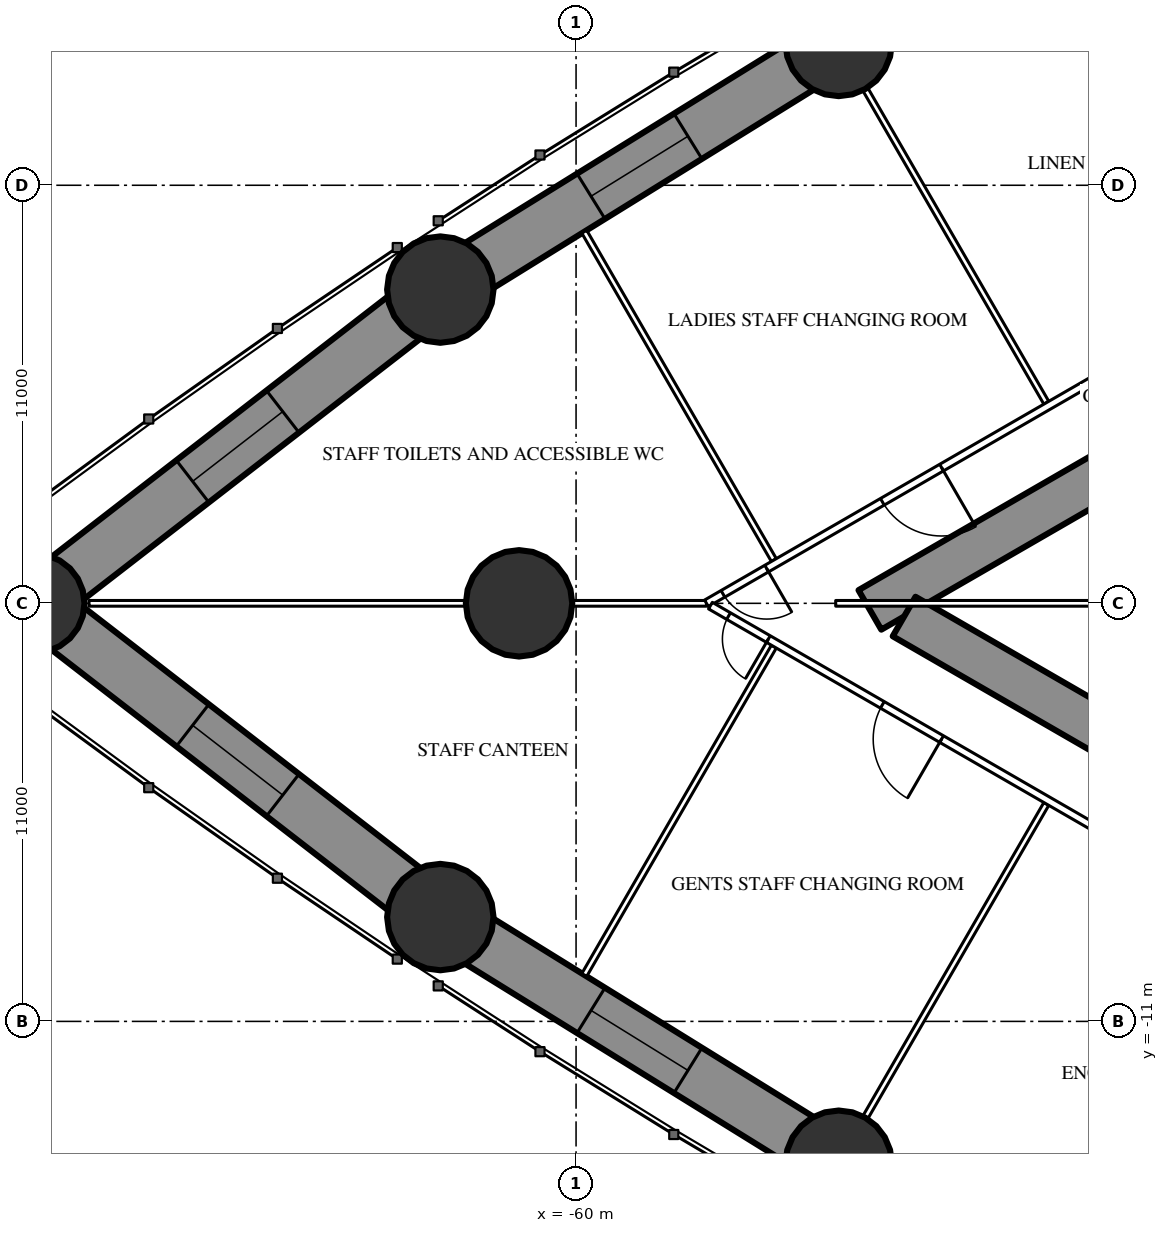
"""IFC4 building model, lengths in metres.
Left out: names, types, materials, properties, quantities, classifications, styles, units other than length and angle.
Written with IfcOpenShell. Run it as: python <this file> out.ifc"""

import sys

from ifc_helpers import new_model, si_unit, direction, frame, frame_2d, origin, origin_2d, place, context, subcontext, project, spatial, rectangle, hollow_circle, extrude, element, fill, save


model = new_model("IFC4")
c1 = context("Model", 3, precision=1e-05, world=origin(), true_north=direction((0.0, 1.0)))
c2 = subcontext(c1, "Body", "Model", "MODEL_VIEW")
j1 = project(units=[si_unit("LENGTHUNIT", "METRE"), si_unit("PLANEANGLEUNIT", "RADIAN")], contexts=[c1])
p1 = place(None, origin())
s1 = spatial("IfcSite", under=j1, at=p1, CompositionType="ELEMENT")
p2 = place(p1, origin())
s2 = spatial("IfcBuilding", under=s1, at=p2, CompositionType="ELEMENT")
p3 = place(p2, frame((0.0, 0.0, 77.5)))
s3 = spatial("IfcBuildingStorey", under=s2, at=p3, CompositionType="ELEMENT", Elevation=77.5)
p4 = place(p3, frame((-74.235, 0.0, 0.0), z_axis=(0.0, 0.0, 1.0), x_axis=(1.0, 0.0, 0.0)))
e1 = element("IfcColumn", 1, at=p4, inside=s3, PredefinedType="COLUMN", context=c2, shape_type="SweptSolid", body=[
    extrude(hollow_circle(Radius=1.3, WallThickness=0.1, at=origin_2d()), origin(), (0.0, 0.0, 1.0), 3.5),
])
for number, where, z_axis, x_axis in (
    (2, (-63.572, -8.255, 0.0), (0.0, 0.0, 1.0), (1.0, 0.0, 0.0)),
    (3, (-53.09, -14.745, 0.0), (0.0, 0.0, 1.0), (1.0, 0.0, 0.0)),
    (4, (-53.09, 14.745, 0.0), (0.0, 0.0, 1.0), (1.0, 0.0, 0.0)),
    (5, (-63.572, 8.255, 0.0), (0.0, 0.0, 1.0), (1.0, 0.0, 0.0)),
):
    element("IfcColumn", number, at=place(p3, frame(where, z_axis=z_axis, x_axis=x_axis)), inside=s3, PredefinedType="COLUMN", context=c2, shape_type="SweptSolid", body=[
        extrude(hollow_circle(Radius=1.4, WallThickness=0.12, at=origin_2d()), origin(), (0.0, 0.0, 1.0), 3.5),
    ])
p5 = place(p3, frame((-61.5, 0.0, 0.0), z_axis=(0.0, 0.0, 1.0), x_axis=(1.0, 0.0, 0.0)))
e6 = element("IfcColumn", 6, at=p5, inside=s3, PredefinedType="COLUMN", context=c2, shape_type="SweptSolid", body=[
    extrude(hollow_circle(Radius=1.4, WallThickness=0.1, at=origin_2d()), origin(), (0.0, 0.0, 1.0), 3.5),
])
p6 = place(p3, frame((-27.2, 14.3, 0.0), z_axis=(0.0, 0.0, 1.0), x_axis=(-0.866026593062, -0.499997940104, 0.0)))
e7 = element("IfcWall", 7, at=p6, inside=s3, PredefinedType="SHEAR", context=c2, shape_type="SweptSolid", body=[
    extrude(rectangle(XDim=28.946, YDim=1.2, at=frame_2d((14.473, 0.0))), origin(), (0.0, 0.0, 1.0), 3.5),
])
p7 = place(p6, frame((5.85, 0.0, 0.0)))
e8 = element("IfcOpeningElement", 8, at=p7, cuts=e7, PredefinedType="OPENING", context=c2, shape_type="SweptSolid", body=[
    extrude(rectangle(XDim=1.0, YDim=2.2, at=frame_2d((0.5, 1.1))), frame((0.0, 0.61, 0.0), z_axis=(0.0, -1.0, 0.0), x_axis=(1.0, 0.0, 0.0)), (0.0, 0.0, 1.0), 1.22),
])
p8 = place(p6, frame((13.395, 0.0, 0.0)))
e9 = element("IfcOpeningElement", 9, at=p8, cuts=e7, PredefinedType="OPENING", context=c2, shape_type="SweptSolid", body=[
    extrude(rectangle(XDim=1.8, YDim=2.04, at=frame_2d((0.9, 1.02))), frame((0.0, 0.61, 0.0), z_axis=(0.0, -1.0, 0.0), x_axis=(1.0, 0.0, 0.0)), (0.0, 0.0, 1.0), 1.22),
])
p9 = place(p3, frame((-27.2, -14.3, 0.0), z_axis=(0.0, 0.0, 1.0), x_axis=(-0.866024021859, 0.500002393557, 0.0)))
e10 = element("IfcWall", 10, at=p9, inside=s3, PredefinedType="SHEAR", context=c2, shape_type="SweptSolid", body=[
    extrude(rectangle(XDim=27.907, YDim=1.2, at=frame_2d((13.954, 0.0))), origin(), (0.0, 0.0, 1.0), 3.5),
])
p10 = place(p9, frame((4.6, 0.0, 0.0)))
e11 = element("IfcOpeningElement", 11, at=p10, cuts=e10, PredefinedType="OPENING", context=c2, shape_type="SweptSolid", body=[
    extrude(rectangle(XDim=1.0, YDim=2.2, at=frame_2d((0.5, 1.1))), frame((0.0, 0.61, 0.0), z_axis=(0.0, -1.0, 0.0), x_axis=(1.0, 0.0, 0.0)), (0.0, 0.0, 1.0), 1.22),
])
p11 = place(p9, frame((13.845, 0.0, 0.0)))
e12 = element("IfcOpeningElement", 12, at=p11, cuts=e10, PredefinedType="OPENING", context=c2, shape_type="SweptSolid", body=[
    extrude(rectangle(XDim=1.8, YDim=2.2, at=frame_2d((0.9, 1.1))), frame((0.0, 0.61, 0.0), z_axis=(0.0, -1.0, 0.0), x_axis=(1.0, 0.0, 0.0)), (0.0, 0.0, 1.0), 1.22),
])
p12 = place(p3, frame((-42.245, 20.607, 0.0), z_axis=(0.0, 0.0, 1.0), x_axis=(-0.879692855603, -0.475542300749, 0.0)))
e13 = element("IfcWall", 13, at=p12, inside=s3, PredefinedType="SHEAR", context=c2, shape_type="SweptSolid", body=[
    extrude(rectangle(XDim=12.328, YDim=1.4, at=frame_2d((6.164, 0.0))), origin(), (0.0, 0.0, 1.0), 3.5),
])
p13 = place(p12, frame((4.664, 0.0, 0.6)))
e14 = element("IfcOpeningElement", 14, at=p13, cuts=e13, PredefinedType="OPENING", context=c2, shape_type="SweptSolid", body=[
    extrude(rectangle(XDim=3.0, YDim=1.2, at=frame_2d((1.5, 0.6))), frame((0.0, 0.71, 0.0), z_axis=(0.0, -1.0, 0.0), x_axis=(1.0, 0.0, 0.0)), (0.0, 0.0, 1.0), 1.42),
])
p14 = place(p3, frame((-53.09, 14.745, 0.0), z_axis=(0.0, 0.0, 1.0), x_axis=(-0.850225894333, -0.526418016984, 0.0)))
e15 = element("IfcWall", 15, at=p14, inside=s3, PredefinedType="SHEAR", context=c2, shape_type="SweptSolid", body=[
    extrude(rectangle(XDim=12.328, YDim=1.4, at=frame_2d((6.164, 0.0))), origin(), (0.0, 0.0, 1.0), 3.5),
])
p15 = place(p14, frame((4.664, 0.0, 0.6)))
e16 = element("IfcOpeningElement", 16, at=p15, cuts=e15, PredefinedType="OPENING", context=c2, shape_type="SweptSolid", body=[
    extrude(rectangle(XDim=3.0, YDim=1.2, at=frame_2d((1.5, 0.6))), frame((0.0, 0.71, 0.0), z_axis=(0.0, -1.0, 0.0), x_axis=(1.0, 0.0, 0.0)), (0.0, 0.0, 1.0), 1.42),
])
p16 = place(p3, frame((-63.572, 8.255, 0.0), z_axis=(0.0, 0.0, 1.0), x_axis=(-0.790736428665, -0.612156761281, 0.0)))
e17 = element("IfcWall", 17, at=p16, inside=s3, PredefinedType="SHEAR", context=c2, shape_type="SweptSolid", body=[
    extrude(rectangle(XDim=13.485, YDim=1.4, at=frame_2d((6.743, 0.0))), origin(), (0.0, 0.0, 1.0), 3.5),
])
p17 = place(p16, frame((5.243, 0.0, 0.6)))
e18 = element("IfcOpeningElement", 18, at=p17, cuts=e17, PredefinedType="OPENING", context=c2, shape_type="SweptSolid", body=[
    extrude(rectangle(XDim=3.0, YDim=1.2, at=frame_2d((1.5, 0.6))), frame((0.0, 0.71, 0.0), z_axis=(0.0, -1.0, 0.0), x_axis=(1.0, 0.0, 0.0)), (0.0, 0.0, 1.0), 1.42),
])
p18 = place(p3, frame((-74.235, 0.0, 0.0), z_axis=(0.0, 0.0, 1.0), x_axis=(0.790736428665, -0.612156761281, 0.0)))
e19 = element("IfcWall", 19, at=p18, inside=s3, PredefinedType="SHEAR", context=c2, shape_type="SweptSolid", body=[
    extrude(rectangle(XDim=13.485, YDim=1.4, at=frame_2d((6.743, 0.0))), origin(), (0.0, 0.0, 1.0), 3.5),
])
p19 = place(p18, frame((5.243, 0.0, 0.6)))
e20 = element("IfcOpeningElement", 20, at=p19, cuts=e19, PredefinedType="OPENING", context=c2, shape_type="SweptSolid", body=[
    extrude(rectangle(XDim=3.0, YDim=1.2, at=frame_2d((1.5, 0.6))), frame((0.0, 0.71, 0.0), z_axis=(0.0, -1.0, 0.0), x_axis=(1.0, 0.0, 0.0)), (0.0, 0.0, 1.0), 1.42),
])
p20 = place(p3, frame((-63.572, -8.255, 0.0), z_axis=(0.0, 0.0, 1.0), x_axis=(0.850225894333, -0.526418016984, 0.0)))
e21 = element("IfcWall", 21, at=p20, inside=s3, PredefinedType="SHEAR", context=c2, shape_type="SweptSolid", body=[
    extrude(rectangle(XDim=12.328, YDim=1.4, at=frame_2d((6.164, 0.0))), origin(), (0.0, 0.0, 1.0), 3.5),
])
p21 = place(p20, frame((4.664, 0.0, 0.6)))
e22 = element("IfcOpeningElement", 22, at=p21, cuts=e21, PredefinedType="OPENING", context=c2, shape_type="SweptSolid", body=[
    extrude(rectangle(XDim=3.0, YDim=1.2, at=frame_2d((1.5, 0.6))), frame((0.0, 0.71, 0.0), z_axis=(0.0, -1.0, 0.0), x_axis=(1.0, 0.0, 0.0)), (0.0, 0.0, 1.0), 1.42),
])
p22 = place(p3, frame((-53.09, -14.745, 0.0), z_axis=(0.0, 0.0, 1.0), x_axis=(0.879692855603, -0.475542300749, 0.0)))
e23 = element("IfcWall", 23, at=p22, inside=s3, PredefinedType="SHEAR", context=c2, shape_type="SweptSolid", body=[
    extrude(rectangle(XDim=12.328, YDim=1.4, at=frame_2d((6.164, 0.0))), origin(), (0.0, 0.0, 1.0), 3.5),
])
p23 = place(p22, frame((4.664, 0.0, 0.6)))
e24 = element("IfcOpeningElement", 24, at=p23, cuts=e23, PredefinedType="OPENING", context=c2, shape_type="SweptSolid", body=[
    extrude(rectangle(XDim=3.0, YDim=1.2, at=frame_2d((1.5, 0.6))), frame((0.0, 0.71, 0.0), z_axis=(0.0, -1.0, 0.0), x_axis=(1.0, 0.0, 0.0)), (0.0, 0.0, 1.0), 1.42),
])
p24 = place(p3, frame((-47.627, 5.278, 0.0), z_axis=(0.0, 0.0, 1.0), x_axis=(-0.500009844318, 0.86601972009, 0.0)))
e25 = element("IfcWall", 25, at=p24, inside=s3, PredefinedType="PARTITIONING", context=c2, shape_type="SweptSolid", body=[
    extrude(rectangle(XDim=9.51, YDim=0.15, at=frame_2d((4.755, 0.0))), origin(), (0.0, 0.0, 1.0), 2.05),
])
p25 = place(p3, frame((-54.796, 1.139, 0.0), z_axis=(0.0, 0.0, 1.0), x_axis=(-0.500000698915, 0.866025000265, 0.0)))
e26 = element("IfcWall", 26, at=p25, inside=s3, PredefinedType="PARTITIONING", context=c2, shape_type="SweptSolid", body=[
    extrude(rectangle(XDim=9.975, YDim=0.15, at=frame_2d((4.988, 0.0))), origin(), (0.0, 0.0, 1.0), 3.25),
])
p26 = place(p3, frame((-47.627, -5.278, 0.0), z_axis=(0.0, 0.0, 1.0), x_axis=(-0.500009844318, -0.86601972009, 0.0)))
e27 = element("IfcWall", 27, at=p26, inside=s3, PredefinedType="PARTITIONING", context=c2, shape_type="SweptSolid", body=[
    extrude(rectangle(XDim=9.51, YDim=0.15, at=frame_2d((4.755, 0.0))), origin(), (0.0, 0.0, 1.0), 2.05),
])
p27 = place(p3, frame((-54.796, -1.139, 0.0), z_axis=(0.0, 0.0, 1.0), x_axis=(-0.500000698915, -0.866025000265, 0.0)))
e28 = element("IfcWall", 28, at=p27, inside=s3, PredefinedType="PARTITIONING", context=c2, shape_type="SweptSolid", body=[
    extrude(rectangle(XDim=9.975, YDim=0.15, at=frame_2d((4.988, 0.0))), origin(), (0.0, 0.0, 1.0), 3.25),
])
p28 = place(p3, frame((-56.568, 0.0, 0.0), z_axis=(0.0, 0.0, 1.0), x_axis=(-1.0, 0.0, 0.0)))
e29 = element("IfcWall", 29, at=p28, inside=s3, PredefinedType="PARTITIONING", context=c2, shape_type="SweptSolid", body=[
    extrude(rectangle(XDim=16.247, YDim=0.15, at=frame_2d((8.124, 0.0))), origin(), (0.0, 0.0, 1.0), 2.05),
])
p29 = place(p3, frame((-37.7, 10.894, 0.0), z_axis=(0.0, 0.0, 1.0), x_axis=(-0.866027905338, -0.499995667157, 0.0)))
e30 = element("IfcWall", 30, at=p29, inside=s3, PredefinedType="PARTITIONING", context=c2, shape_type="SweptSolid", body=[
    extrude(rectangle(XDim=21.787, YDim=0.2, at=frame_2d((10.894, 0.0))), origin(), (0.0, 0.0, 1.0), 3.25),
])
p30 = place(p29, frame((14.644, 0.0, 0.0)))
e31 = element("IfcOpeningElement", 31, at=p30, cuts=e30, PredefinedType="OPENING", context=c2, shape_type="SweptSolid", body=[
    extrude(rectangle(XDim=1.8, YDim=2.2, at=frame_2d((0.9, 1.1))), frame((0.0, 0.11, 0.0), z_axis=(0.0, -1.0, 0.0), x_axis=(1.0, 0.0, 0.0)), (0.0, 0.0, 1.0), 0.22),
])
p31 = place(p29, frame((19.958, 0.0, 0.0)))
e32 = element("IfcOpeningElement", 32, at=p31, cuts=e30, PredefinedType="OPENING", context=c2, shape_type="SweptSolid", body=[
    extrude(rectangle(XDim=1.329, YDim=2.04, at=frame_2d((0.665, 1.02))), frame((0.0, 0.11, 0.0), z_axis=(0.0, -1.0, 0.0), x_axis=(1.0, 0.0, 0.0)), (0.0, 0.0, 1.0), 0.22),
])
p32 = place(p29, frame((4.815, 0.0, 0.0)))
e33 = element("IfcOpeningElement", 33, at=p32, cuts=e30, PredefinedType="OPENING", context=c2, shape_type="SweptSolid", body=[
    extrude(rectangle(XDim=2.0, YDim=2.4, at=frame_2d((1.0, 1.2))), frame((0.0, 0.11, 0.0), z_axis=(0.0, -1.0, 0.0), x_axis=(1.0, 0.0, 0.0)), (0.0, 0.0, 1.0), 0.22),
])
p33 = place(p3, frame((-36.92, -11.344, 0.0), z_axis=(0.0, 0.0, 1.0), x_axis=(-0.866028313256, 0.499994960614, 0.0)))
e34 = element("IfcWall", 34, at=p33, inside=s3, PredefinedType="PARTITIONING", context=c2, shape_type="SweptSolid", body=[
    extrude(rectangle(XDim=22.568, YDim=0.2, at=frame_2d((11.284, 0.0))), origin(), (0.0, 0.0, 1.0), 3.25),
])
p34 = place(p33, frame((20.808, 0.0, 0.0)))
e35 = element("IfcOpeningElement", 35, at=p34, cuts=e34, PredefinedType="OPENING", context=c2, shape_type="SweptSolid", body=[
    extrude(rectangle(XDim=1.209, YDim=2.2, at=frame_2d((0.604, 1.1))), frame((0.0, 0.11, 0.0), z_axis=(0.0, -1.0, 0.0), x_axis=(1.0, 0.0, 0.0)), (0.0, 0.0, 1.0), 0.22),
])
p35 = place(p33, frame((15.544, 0.0, 0.0)))
e36 = element("IfcOpeningElement", 36, at=p35, cuts=e34, PredefinedType="OPENING", context=c2, shape_type="SweptSolid", body=[
    extrude(rectangle(XDim=1.8, YDim=2.2, at=frame_2d((0.9, 1.1))), frame((0.0, 0.11, 0.0), z_axis=(0.0, -1.0, 0.0), x_axis=(1.0, 0.0, 0.0)), (0.0, 0.0, 1.0), 0.22),
])
p36 = place(p33, frame((5.365, 0.0, 0.0)))
e37 = element("IfcOpeningElement", 37, at=p36, cuts=e34, PredefinedType="OPENING", context=c2, shape_type="SweptSolid", body=[
    extrude(rectangle(XDim=1.8, YDim=2.2, at=frame_2d((0.9, 1.1))), frame((0.0, 0.11, 0.0), z_axis=(0.0, -1.0, 0.0), x_axis=(1.0, 0.0, 0.0)), (0.0, 0.0, 1.0), 0.22),
])
p37 = place(p3, frame((-44.575, 0.0, 0.0), z_axis=(0.0, 0.0, 1.0), x_axis=(-1.0, 0.0, 0.0)))
e38 = element("IfcWall", 38, at=p37, inside=s3, PredefinedType="PARTITIONING", context=c2, shape_type="SweptSolid", body=[
    extrude(rectangle(XDim=8.593, YDim=0.15, at=frame_2d((4.297, 0.0))), origin(), (0.0, 0.0, 1.0), 2.05),
])
p38 = place(p15, origin())
e39 = element("IfcWindow", 39, at=p38, inside=s3, PartitioningType="SINGLE_PANEL", PredefinedType="WINDOW", context=c2, shape_type="SweptSolid", body=[
    extrude(rectangle(XDim=3.0, YDim=1.2, at=frame_2d((1.5, 0.6))), frame((0.0, 0.03, 0.0), z_axis=(0.0, -1.0, 0.0), x_axis=(1.0, 0.0, 0.0)), (0.0, 0.0, 1.0), 0.06),
])
fill(e16, e39)
p39 = place(p17, origin())
e40 = element("IfcWindow", 40, at=p39, inside=s3, PartitioningType="SINGLE_PANEL", PredefinedType="WINDOW", context=c2, shape_type="SweptSolid", body=[
    extrude(rectangle(XDim=3.0, YDim=1.2, at=frame_2d((1.5, 0.6))), frame((0.0, 0.03, 0.0), z_axis=(0.0, -1.0, 0.0), x_axis=(1.0, 0.0, 0.0)), (0.0, 0.0, 1.0), 0.06),
])
fill(e18, e40)
p40 = place(p19, origin())
e41 = element("IfcWindow", 41, at=p40, inside=s3, PartitioningType="SINGLE_PANEL", PredefinedType="WINDOW", context=c2, shape_type="SweptSolid", body=[
    extrude(rectangle(XDim=3.0, YDim=1.2, at=frame_2d((1.5, 0.6))), frame((0.0, 0.03, 0.0), z_axis=(0.0, -1.0, 0.0), x_axis=(1.0, 0.0, 0.0)), (0.0, 0.0, 1.0), 0.06),
])
fill(e20, e41)
p41 = place(p21, origin())
e42 = element("IfcWindow", 42, at=p41, inside=s3, PartitioningType="SINGLE_PANEL", PredefinedType="WINDOW", context=c2, shape_type="SweptSolid", body=[
    extrude(rectangle(XDim=3.0, YDim=1.2, at=frame_2d((1.5, 0.6))), frame((0.0, 0.03, 0.0), z_axis=(0.0, -1.0, 0.0), x_axis=(1.0, 0.0, 0.0)), (0.0, 0.0, 1.0), 0.06),
])
fill(e22, e42)
p42 = place(p30, origin())
e43 = element("IfcDoor", 43, at=p42, inside=s3, OperationType="DOUBLE_DOOR_SINGLE_SWING", PredefinedType="DOOR", context=c2, shape_type="SweptSolid", body=[
    extrude(rectangle(XDim=1.8, YDim=2.2, at=frame_2d((0.9, 1.1))), frame((0.0, 0.025, 0.0), z_axis=(0.0, -1.0, 0.0), x_axis=(1.0, 0.0, 0.0)), (0.0, 0.0, 1.0), 0.05),
])
fill(e31, e43)
p43 = place(p31, origin())
e44 = element("IfcDoor", 44, at=p43, inside=s3, OperationType="SINGLE_SWING_LEFT", PredefinedType="DOOR", context=c2, shape_type="SweptSolid", body=[
    extrude(rectangle(XDim=1.329, YDim=2.04, at=frame_2d((0.665, 1.02))), frame((0.0, 0.025, 0.0), z_axis=(0.0, -1.0, 0.0), x_axis=(1.0, 0.0, 0.0)), (0.0, 0.0, 1.0), 0.05),
])
fill(e32, e44)
p44 = place(p34, origin())
e45 = element("IfcDoor", 45, at=p44, inside=s3, OperationType="SINGLE_SWING_LEFT", PredefinedType="DOOR", context=c2, shape_type="SweptSolid", body=[
    extrude(rectangle(XDim=1.209, YDim=2.2, at=frame_2d((0.604, 1.1))), frame((0.0, 0.025, 0.0), z_axis=(0.0, -1.0, 0.0), x_axis=(1.0, 0.0, 0.0)), (0.0, 0.0, 1.0), 0.05),
])
fill(e35, e45)
p45 = place(p35, origin())
e46 = element("IfcDoor", 46, at=p45, inside=s3, OperationType="DOUBLE_DOOR_SINGLE_SWING", PredefinedType="DOOR", context=c2, shape_type="SweptSolid", body=[
    extrude(rectangle(XDim=1.8, YDim=2.2, at=frame_2d((0.9, 1.1))), frame((0.0, 0.025, 0.0), z_axis=(0.0, -1.0, 0.0), x_axis=(1.0, 0.0, 0.0)), (0.0, 0.0, 1.0), 0.05),
])
fill(e36, e46)
save(model, sys.argv[1])
